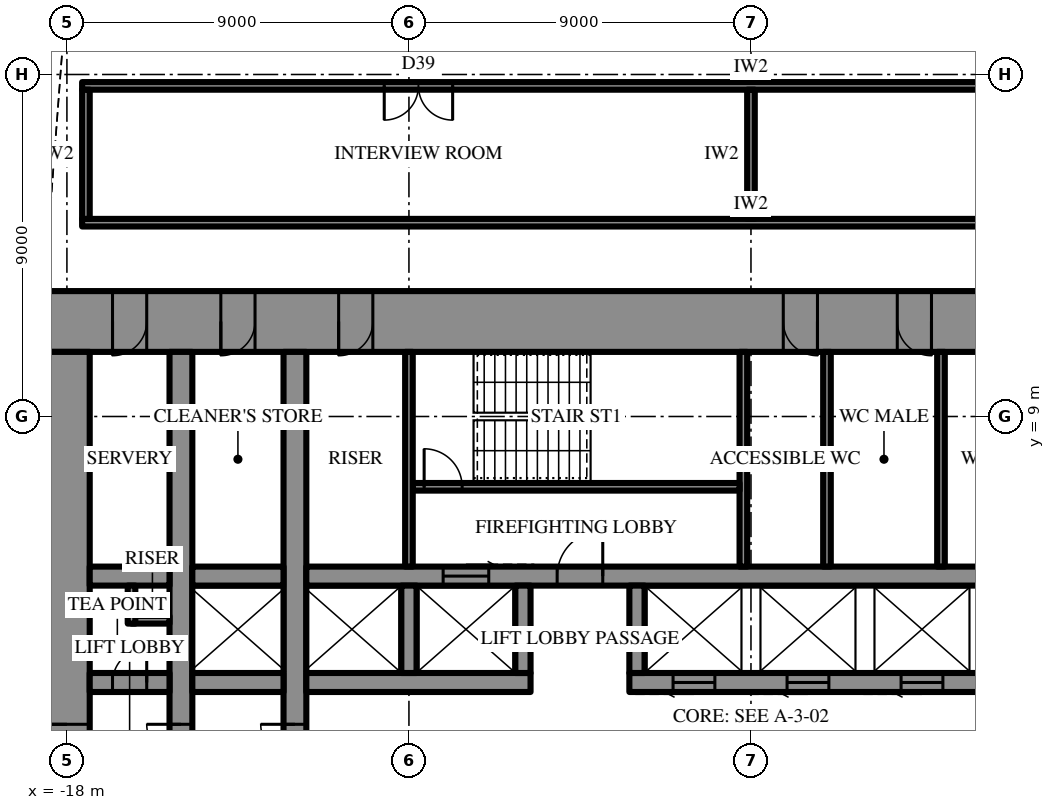
"""IFC4 building model, lengths in metres.
Left out: names, types, materials, properties, quantities, classifications, styles, units other than length and angle.
Written with IfcOpenShell. Run it as: python <this file> out.ifc"""

import sys

from ifc_helpers import new_model, si_unit, direction, frame, frame_2d, origin, place, context, subcontext, project, spatial, rectangle, extrude, element, fill, save


model = new_model("IFC4")
c1 = context("Model", 3, precision=1e-05, world=origin(), true_north=direction((0.0, 1.0)))
c2 = subcontext(c1, "Body", "Model", "MODEL_VIEW")
j1 = project(units=[si_unit("LENGTHUNIT", "METRE"), si_unit("PLANEANGLEUNIT", "RADIAN")], contexts=[c1])
p1 = place(None, origin())
s1 = spatial("IfcSite", under=j1, at=p1, CompositionType="ELEMENT")
p2 = place(p1, origin())
s2 = spatial("IfcBuilding", under=s1, at=p2, CompositionType="ELEMENT")
p3 = place(p2, frame((0.0, 0.0, 161.5)))
s3 = spatial("IfcBuildingStorey", under=s2, at=p3, CompositionType="ELEMENT", Elevation=161.5)
p4 = place(p3, frame((-18.6, 11.5, 0.0), z_axis=(0.0, 0.0, 1.0), x_axis=(1.0, 0.0, 0.0)))
e1 = element("IfcWall", 1, at=p4, inside=s3, PredefinedType="SHEAR", context=c2, shape_type="SweptSolid", body=[
    extrude(rectangle(XDim=37.2, YDim=1.6, at=frame_2d((18.6, 0.0))), origin(), (0.0, 0.0, 1.0), 4.2),
])
p5 = place(p4, frame((19.45, 0.0, 0.0)))
e2 = element("IfcOpeningElement", 2, at=p5, cuts=e1, PredefinedType="OPENING", context=c2, shape_type="SweptSolid", body=[
    extrude(rectangle(XDim=0.9, YDim=2.2, at=frame_2d((0.45, 1.1))), frame((0.0, 0.81, 0.0), z_axis=(0.0, -1.0, 0.0), x_axis=(1.0, 0.0, 0.0)), (0.0, 0.0, 1.0), 1.62),
])
p6 = place(p4, frame((22.45, 0.0, 0.0)))
e3 = element("IfcOpeningElement", 3, at=p6, cuts=e1, PredefinedType="OPENING", context=c2, shape_type="SweptSolid", body=[
    extrude(rectangle(XDim=0.9, YDim=2.2, at=frame_2d((0.45, 1.1))), frame((0.0, 0.81, 0.0), z_axis=(0.0, -1.0, 0.0), x_axis=(1.0, 0.0, 0.0)), (0.0, 0.0, 1.0), 1.62),
])
p7 = place(p4, frame((25.5, 0.0, 0.0)))
e4 = element("IfcOpeningElement", 4, at=p7, cuts=e1, PredefinedType="OPENING", context=c2, shape_type="SweptSolid", body=[
    extrude(rectangle(XDim=1.0, YDim=2.2, at=frame_2d((0.5, 1.1))), frame((0.0, 0.81, 0.0), z_axis=(0.0, -1.0, 0.0), x_axis=(1.0, 0.0, 0.0)), (0.0, 0.0, 1.0), 1.62),
])
p8 = place(p4, frame((1.8, 0.0, 0.0)))
e5 = element("IfcOpeningElement", 5, at=p8, cuts=e1, PredefinedType="OPENING", context=c2, shape_type="SweptSolid", body=[
    extrude(rectangle(XDim=0.9, YDim=2.2, at=frame_2d((0.45, 1.1))), frame((0.0, 0.81, 0.0), z_axis=(0.0, -1.0, 0.0), x_axis=(1.0, 0.0, 0.0)), (0.0, 0.0, 1.0), 1.62),
])
p9 = place(p4, frame((4.65, 0.0, 0.0)))
e6 = element("IfcOpeningElement", 6, at=p9, cuts=e1, PredefinedType="OPENING", context=c2, shape_type="SweptSolid", body=[
    extrude(rectangle(XDim=0.9, YDim=2.2, at=frame_2d((0.45, 1.1))), frame((0.0, 0.81, 0.0), z_axis=(0.0, -1.0, 0.0), x_axis=(1.0, 0.0, 0.0)), (0.0, 0.0, 1.0), 1.62),
])
p10 = place(p4, frame((7.75, 0.0, 0.0)))
e7 = element("IfcOpeningElement", 7, at=p10, cuts=e1, PredefinedType="OPENING", context=c2, shape_type="SweptSolid", body=[
    extrude(rectangle(XDim=0.9, YDim=2.2, at=frame_2d((0.45, 1.1))), frame((0.0, 0.81, 0.0), z_axis=(0.0, -1.0, 0.0), x_axis=(1.0, 0.0, 0.0)), (0.0, 0.0, 1.0), 1.62),
])
p11 = place(p4, frame((28.55, 0.0, 0.0)))
e8 = element("IfcOpeningElement", 8, at=p11, cuts=e1, PredefinedType="OPENING", context=c2, shape_type="SweptSolid", body=[
    extrude(rectangle(XDim=0.9, YDim=2.2, at=frame_2d((0.45, 1.1))), frame((0.0, 0.81, 0.0), z_axis=(0.0, -1.0, 0.0), x_axis=(1.0, 0.0, 0.0)), (0.0, 0.0, 1.0), 1.62),
])
p12 = place(p4, frame((31.65, 0.0, 0.0)))
e9 = element("IfcOpeningElement", 9, at=p12, cuts=e1, PredefinedType="OPENING", context=c2, shape_type="SweptSolid", body=[
    extrude(rectangle(XDim=0.9, YDim=2.2, at=frame_2d((0.45, 1.1))), frame((0.0, 0.81, 0.0), z_axis=(0.0, -1.0, 0.0), x_axis=(1.0, 0.0, 0.0)), (0.0, 0.0, 1.0), 1.62),
])
p13 = place(p4, frame((34.5, 0.0, 0.0)))
e10 = element("IfcOpeningElement", 10, at=p13, cuts=e1, PredefinedType="OPENING", context=c2, shape_type="SweptSolid", body=[
    extrude(rectangle(XDim=0.9, YDim=2.2, at=frame_2d((0.45, 1.1))), frame((0.0, 0.81, 0.0), z_axis=(0.0, -1.0, 0.0), x_axis=(1.0, 0.0, 0.0)), (0.0, 0.0, 1.0), 1.62),
])
p14 = place(p3, frame((-18.0, 10.7, 0.0), z_axis=(0.0, 0.0, 1.0), x_axis=(0.0, -1.0, 0.0)))
e11 = element("IfcWall", 11, at=p14, inside=s3, PredefinedType="SHEAR", context=c2, shape_type="SweptSolid", body=[
    extrude(rectangle(XDim=21.4, YDim=1.2, at=frame_2d((10.7, 0.0))), origin(), (0.0, 0.0, 1.0), 4.2),
])
p15 = place(p14, frame((9.8, 0.0, 0.0)))
e12 = element("IfcOpeningElement", 12, at=p15, cuts=e11, PredefinedType="OPENING", context=c2, shape_type="SweptSolid", body=[
    extrude(rectangle(XDim=1.8, YDim=2.4, at=frame_2d((0.9, 1.2))), frame((0.0, 0.61, 0.0), z_axis=(0.0, -1.0, 0.0), x_axis=(1.0, 0.0, 0.0)), (0.0, 0.0, 1.0), 1.22),
])
p16 = place(p3, frame((-12.0, -10.7, 0.0), z_axis=(0.0, 0.0, 1.0), x_axis=(0.0, 1.0, 0.0)))
e13 = element("IfcWall", 13, at=p16, inside=s3, PredefinedType="SHEAR", context=c2, shape_type="SweptSolid", body=[
    extrude(rectangle(XDim=21.4, YDim=0.6, at=frame_2d((10.7, 0.0))), origin(), (0.0, 0.0, 1.0), 4.2),
])
p17 = place(p16, frame((9.8, 0.0, 0.0)))
e14 = element("IfcOpeningElement", 14, at=p17, cuts=e13, PredefinedType="OPENING", context=c2, shape_type="SweptSolid", body=[
    extrude(rectangle(XDim=1.8, YDim=2.4, at=frame_2d((0.9, 1.2))), frame((0.0, 0.31, 0.0), z_axis=(0.0, -1.0, 0.0), x_axis=(1.0, 0.0, 0.0)), (0.0, 0.0, 1.0), 0.62),
])
p18 = place(p3, frame((-15.0, -10.7, 0.0), z_axis=(0.0, 0.0, 1.0), x_axis=(0.0, 1.0, 0.0)))
e15 = element("IfcWall", 15, at=p18, inside=s3, PredefinedType="SHEAR", context=c2, shape_type="SweptSolid", body=[
    extrude(rectangle(XDim=21.4, YDim=0.6, at=frame_2d((10.7, 0.0))), origin(), (0.0, 0.0, 1.0), 4.2),
])
p19 = place(p18, frame((9.8, 0.0, 0.0)))
e16 = element("IfcOpeningElement", 16, at=p19, cuts=e15, PredefinedType="OPENING", context=c2, shape_type="SweptSolid", body=[
    extrude(rectangle(XDim=1.8, YDim=2.4, at=frame_2d((0.9, 1.2))), frame((0.0, 0.31, 0.0), z_axis=(0.0, -1.0, 0.0), x_axis=(1.0, 0.0, 0.0)), (0.0, 0.0, 1.0), 0.62),
])
p20 = place(p3, frame((-17.4, 2.0, 0.0), z_axis=(0.0, 0.0, 1.0), x_axis=(1.0, 0.0, 0.0)))
e17 = element("IfcWall", 17, at=p20, inside=s3, PredefinedType="SHEAR", context=c2, shape_type="SweptSolid", body=[
    extrude(rectangle(XDim=2.1, YDim=0.5, at=frame_2d((1.05, 0.0))), origin(), (0.0, 0.0, 1.0), 4.2),
])
p21 = place(p20, frame((0.6, 0.0, 0.0)))
e18 = element("IfcOpeningElement", 18, at=p21, cuts=e17, PredefinedType="OPENING", context=c2, shape_type="SweptSolid", body=[
    extrude(rectangle(XDim=0.9, YDim=2.2, at=frame_2d((0.45, 1.1))), frame((0.0, 0.26, 0.0), z_axis=(0.0, -1.0, 0.0), x_axis=(1.0, 0.0, 0.0)), (0.0, 0.0, 1.0), 0.52),
])
p22 = place(p3, frame((-14.7, 2.0, 0.0), z_axis=(0.0, 0.0, 1.0), x_axis=(1.0, 0.0, 0.0)))
e19 = element("IfcWall", 19, at=p22, inside=s3, PredefinedType="SHEAR", context=c2, shape_type="SweptSolid", body=[
    extrude(rectangle(XDim=2.4, YDim=0.5, at=frame_2d((1.2, 0.0))), origin(), (0.0, 0.0, 1.0), 4.2),
])
p23 = place(p3, frame((-11.7, 2.0, 0.0), z_axis=(0.0, 0.0, 1.0), x_axis=(1.0, 0.0, 0.0)))
e20 = element("IfcWall", 20, at=p23, inside=s3, PredefinedType="SHEAR", context=c2, shape_type="SweptSolid", body=[
    extrude(rectangle(XDim=5.9, YDim=0.5, at=frame_2d((2.95, 0.0))), origin(), (0.0, 0.0, 1.0), 4.2),
])
p24 = place(p3, frame((-3.2, 2.0, 0.0), z_axis=(0.0, 0.0, 1.0), x_axis=(1.0, 0.0, 0.0)))
e21 = element("IfcWall", 21, at=p24, inside=s3, PredefinedType="SHEAR", context=c2, shape_type="SweptSolid", body=[
    extrude(rectangle(XDim=14.9, YDim=0.5, at=frame_2d((7.45, 0.0))), origin(), (0.0, 0.0, 1.0), 4.2),
])
p25 = place(p24, frame((1.15, 0.0, 0.0)))
e22 = element("IfcOpeningElement", 22, at=p25, cuts=e21, PredefinedType="OPENING", context=c2, shape_type="SweptSolid", body=[
    extrude(rectangle(XDim=1.1, YDim=2.2, at=frame_2d((0.55, 1.1))), frame((0.0, 0.26, 0.0), z_axis=(0.0, -1.0, 0.0), x_axis=(1.0, 0.0, 0.0)), (0.0, 0.0, 1.0), 0.52),
])
p26 = place(p24, frame((4.15, 0.0, 0.0)))
e23 = element("IfcOpeningElement", 23, at=p26, cuts=e21, PredefinedType="OPENING", context=c2, shape_type="SweptSolid", body=[
    extrude(rectangle(XDim=1.1, YDim=2.2, at=frame_2d((0.55, 1.1))), frame((0.0, 0.26, 0.0), z_axis=(0.0, -1.0, 0.0), x_axis=(1.0, 0.0, 0.0)), (0.0, 0.0, 1.0), 0.52),
])
p27 = place(p24, frame((7.15, 0.0, 0.0)))
e24 = element("IfcOpeningElement", 24, at=p27, cuts=e21, PredefinedType="OPENING", context=c2, shape_type="SweptSolid", body=[
    extrude(rectangle(XDim=1.1, YDim=2.2, at=frame_2d((0.55, 1.1))), frame((0.0, 0.26, 0.0), z_axis=(0.0, -1.0, 0.0), x_axis=(1.0, 0.0, 0.0)), (0.0, 0.0, 1.0), 0.52),
])
p28 = place(p24, frame((10.15, 0.0, 0.0)))
e25 = element("IfcOpeningElement", 25, at=p28, cuts=e21, PredefinedType="OPENING", context=c2, shape_type="SweptSolid", body=[
    extrude(rectangle(XDim=1.1, YDim=2.2, at=frame_2d((0.55, 1.1))), frame((0.0, 0.26, 0.0), z_axis=(0.0, -1.0, 0.0), x_axis=(1.0, 0.0, 0.0)), (0.0, 0.0, 1.0), 0.52),
])
p29 = place(p3, frame((-17.4, 4.8, 0.0), z_axis=(0.0, 0.0, 1.0), x_axis=(1.0, 0.0, 0.0)))
e26 = element("IfcWall", 26, at=p29, inside=s3, PredefinedType="SHEAR", context=c2, shape_type="SweptSolid", body=[
    extrude(rectangle(XDim=2.1, YDim=0.5, at=frame_2d((1.05, 0.0))), origin(), (0.0, 0.0, 1.0), 4.2),
])
p30 = place(p3, frame((-14.7, 4.8, 0.0), z_axis=(0.0, 0.0, 1.0), x_axis=(1.0, 0.0, 0.0)))
e27 = element("IfcWall", 27, at=p30, inside=s3, PredefinedType="SHEAR", context=c2, shape_type="SweptSolid", body=[
    extrude(rectangle(XDim=2.4, YDim=0.5, at=frame_2d((1.2, 0.0))), origin(), (0.0, 0.0, 1.0), 4.2),
])
p31 = place(p3, frame((-11.7, 4.8, 0.0), z_axis=(0.0, 0.0, 1.0), x_axis=(1.0, 0.0, 0.0)))
e28 = element("IfcWall", 28, at=p31, inside=s3, PredefinedType="SHEAR", context=c2, shape_type="SweptSolid", body=[
    extrude(rectangle(XDim=23.4, YDim=0.5, at=frame_2d((11.7, 0.0))), origin(), (0.0, 0.0, 1.0), 4.2),
])
p32 = place(p31, frame((6.6, 0.0, 0.0)))
e29 = element("IfcOpeningElement", 29, at=p32, cuts=e28, PredefinedType="OPENING", context=c2, shape_type="SweptSolid", body=[
    extrude(rectangle(XDim=1.2, YDim=2.2, at=frame_2d((0.6, 1.1))), frame((0.0, 0.26, 0.0), z_axis=(0.0, -1.0, 0.0), x_axis=(1.0, 0.0, 0.0)), (0.0, 0.0, 1.0), 0.52),
])
p33 = place(p31, frame((3.6, 0.0, 0.0)))
e30 = element("IfcOpeningElement", 30, at=p33, cuts=e28, PredefinedType="OPENING", context=c2, shape_type="SweptSolid", body=[
    extrude(rectangle(XDim=1.2, YDim=2.2, at=frame_2d((0.6, 1.1))), frame((0.0, 0.26, 0.0), z_axis=(0.0, -1.0, 0.0), x_axis=(1.0, 0.0, 0.0)), (0.0, 0.0, 1.0), 0.52),
])
for number, where, z_axis, x_axis in (
    (31, (-9.0, 2.25, 0.0), (0.0, 0.0, 1.0), (0.0, 1.0, 0.0)),
    (32, (-6.0, 2.25, 0.0), (0.0, 0.0, 1.0), (0.0, 1.0, 0.0)),
    (33, (-3.0, 2.25, 0.0), (0.0, 0.0, 1.0), (0.0, 1.0, 0.0)),
):
    element("IfcWall", number, at=place(p3, frame(where, z_axis=z_axis, x_axis=x_axis)), inside=s3, PredefinedType="SHEAR", context=c2, shape_type="SweptSolid", body=[
        extrude(rectangle(XDim=2.3, YDim=0.4, at=frame_2d((1.15, 0.0))), origin(), (0.0, 0.0, 1.0), 4.2),
    ])
p34 = place(p3, frame((-0.2, 5.05, 0.0), z_axis=(0.0, 0.0, 1.0), x_axis=(0.0, 1.0, 0.0)))
e34 = element("IfcWall", 34, at=p34, inside=s3, PredefinedType="SHEAR", context=c2, shape_type="SweptSolid", body=[
    extrude(rectangle(XDim=5.65, YDim=0.2, at=frame_2d((2.825, 0.0))), origin(), (0.0, 0.0, 1.0), 4.2),
])
p35 = place(p3, frame((-8.9, 7.15, 0.0), z_axis=(0.0, 0.0, 1.0), x_axis=(1.0, 0.0, 0.0)))
e35 = element("IfcWall", 35, at=p35, inside=s3, PredefinedType="SHEAR", context=c2, shape_type="SweptSolid", body=[
    extrude(rectangle(XDim=8.6, YDim=0.2, at=frame_2d((4.3, 0.0))), origin(), (0.0, 0.0, 1.0), 4.2),
])
p36 = place(p35, frame((0.3, 0.0, 0.0)))
e36 = element("IfcOpeningElement", 36, at=p36, cuts=e35, PredefinedType="OPENING", context=c2, shape_type="SweptSolid", body=[
    extrude(rectangle(XDim=1.0, YDim=2.2, at=frame_2d((0.5, 1.1))), frame((0.0, 0.11, 0.0), z_axis=(0.0, -1.0, 0.0), x_axis=(1.0, 0.0, 0.0)), (0.0, 0.0, 1.0), 0.22),
])
for number, where, z_axis, x_axis in (
    (37, (-9.0, 5.05, 0.0), (0.0, 0.0, 1.0), (0.0, 1.0, 0.0)),
    (38, (2.0, 5.05, 0.0), (0.0, 0.0, 1.0), (0.0, 1.0, 0.0)),
    (39, (5.0, 5.05, 0.0), (0.0, 0.0, 1.0), (0.0, 1.0, 0.0)),
):
    element("IfcWall", number, at=place(p3, frame(where, z_axis=z_axis, x_axis=x_axis)), inside=s3, PredefinedType="PARTITIONING", context=c2, shape_type="SweptSolid", body=[
        extrude(rectangle(XDim=5.65, YDim=0.2, at=frame_2d((2.825, 0.0))), origin(), (0.0, 0.0, 1.0), 4.0),
    ])
for number, where, z_axis, x_axis in (
    (40, (-16.3, 3.65, 0.0), (0.0, 0.0, 1.0), (1.0, 0.0, 0.0)),
    (41, (-16.3, 3.55, 0.0), (0.0, 0.0, 1.0), (0.0, 1.0, 0.0)),
):
    element("IfcWall", number, at=place(p3, frame(where, z_axis=z_axis, x_axis=x_axis)), inside=s3, PredefinedType="PARTITIONING", context=c2, shape_type="SweptSolid", body=[
        extrude(rectangle(XDim=1.0, YDim=0.2, at=frame_2d((0.5, 0.0))), origin(), (0.0, 0.0, 1.0), 4.0),
    ])
p37 = place(p3, frame((-17.6, 14.1, 0.0), z_axis=(0.0, 0.0, 1.0), x_axis=(1.0, 0.0, 0.0)))
e42 = element("IfcWall", 42, at=p37, inside=s3, PredefinedType="PARTITIONING", context=c2, shape_type="SweptSolid", body=[
    extrude(rectangle(XDim=35.2, YDim=0.2, at=frame_2d((17.6, 0.0))), origin(), (0.0, 0.0, 1.0), 4.0),
])
p38 = place(p3, frame((-17.6, 17.7, 0.0), z_axis=(0.0, 0.0, 1.0), x_axis=(1.0, 0.0, 0.0)))
e43 = element("IfcWall", 43, at=p38, inside=s3, PredefinedType="PARTITIONING", context=c2, shape_type="SweptSolid", body=[
    extrude(rectangle(XDim=35.2, YDim=0.2, at=frame_2d((17.6, 0.0))), origin(), (0.0, 0.0, 1.0), 4.0),
])
p39 = place(p38, frame((7.95, 0.0, 0.0)))
e44 = element("IfcOpeningElement", 44, at=p39, cuts=e43, PredefinedType="OPENING", context=c2, shape_type="SweptSolid", body=[
    extrude(rectangle(XDim=1.8, YDim=2.4, at=frame_2d((0.9, 1.2))), frame((0.0, 0.11, 0.0), z_axis=(0.0, -1.0, 0.0), x_axis=(1.0, 0.0, 0.0)), (0.0, 0.0, 1.0), 0.22),
])
p40 = place(p38, frame((25.45, 0.0, 0.0)))
e45 = element("IfcOpeningElement", 45, at=p40, cuts=e43, PredefinedType="OPENING", context=c2, shape_type="SweptSolid", body=[
    extrude(rectangle(XDim=1.8, YDim=2.4, at=frame_2d((0.9, 1.2))), frame((0.0, 0.11, 0.0), z_axis=(0.0, -1.0, 0.0), x_axis=(1.0, 0.0, 0.0)), (0.0, 0.0, 1.0), 0.22),
])
p41 = place(p3, frame((-17.5, 14.2, 0.0), z_axis=(0.0, 0.0, 1.0), x_axis=(0.0, 1.0, 0.0)))
e46 = element("IfcWall", 46, at=p41, inside=s3, PredefinedType="PARTITIONING", context=c2, shape_type="SweptSolid", body=[
    extrude(rectangle(XDim=3.4, YDim=0.2, at=frame_2d((1.7, 0.0))), origin(), (0.0, 0.0, 1.0), 4.0),
])
p42 = place(p3, frame((0.0, 14.2, 0.0), z_axis=(0.0, 0.0, 1.0), x_axis=(0.0, 1.0, 0.0)))
e47 = element("IfcWall", 47, at=p42, inside=s3, PredefinedType="PARTITIONING", context=c2, shape_type="SweptSolid", body=[
    extrude(rectangle(XDim=3.4, YDim=0.2, at=frame_2d((1.7, 0.0))), origin(), (0.0, 0.0, 1.0), 2.992),
])
p43 = place(p15, frame((1.8, 0.0, 0.0), z_axis=(0.0, 0.0, 1.0), x_axis=(-1.0, 0.0, 0.0)))
e48 = element("IfcDoor", 48, at=p43, inside=s3, OperationType="DOUBLE_DOOR_SINGLE_SWING", PredefinedType="DOOR", context=c2, shape_type="SweptSolid", body=[
    extrude(rectangle(XDim=1.8, YDim=2.4, at=frame_2d((0.9, 1.2))), frame((0.0, 0.025, 0.0), z_axis=(0.0, -1.0, 0.0), x_axis=(1.0, 0.0, 0.0)), (0.0, 0.0, 1.0), 0.05),
])
fill(e12, e48)
p44 = place(p32, origin())
e49 = element("IfcDoor", 49, at=p44, inside=s3, OperationType="SINGLE_SWING_LEFT", PredefinedType="DOOR", context=c2, shape_type="SweptSolid", body=[
    extrude(rectangle(XDim=1.2, YDim=2.2, at=frame_2d((0.6, 1.1))), frame((0.0, 0.025, 0.0), z_axis=(0.0, -1.0, 0.0), x_axis=(1.0, 0.0, 0.0)), (0.0, 0.0, 1.0), 0.05),
])
fill(e29, e49)
p45 = place(p36, origin())
e50 = element("IfcDoor", 50, at=p45, inside=s3, OperationType="SINGLE_SWING_RIGHT", PredefinedType="DOOR", context=c2, shape_type="SweptSolid", body=[
    extrude(rectangle(XDim=1.0, YDim=2.2, at=frame_2d((0.5, 1.1))), frame((0.0, 0.025, 0.0), z_axis=(0.0, -1.0, 0.0), x_axis=(1.0, 0.0, 0.0)), (0.0, 0.0, 1.0), 0.05),
])
fill(e36, e50)
p46 = place(p5, frame((0.9, 0.0, 0.0), z_axis=(0.0, 0.0, 1.0), x_axis=(-1.0, 0.0, 0.0)))
e51 = element("IfcDoor", 51, at=p46, inside=s3, OperationType="SINGLE_SWING_RIGHT", PredefinedType="DOOR", context=c2, shape_type="SweptSolid", body=[
    extrude(rectangle(XDim=0.9, YDim=2.2, at=frame_2d((0.45, 1.1))), frame((0.0, 0.025, 0.0), z_axis=(0.0, -1.0, 0.0), x_axis=(1.0, 0.0, 0.0)), (0.0, 0.0, 1.0), 0.05),
])
fill(e2, e51)
p47 = place(p6, frame((0.9, 0.0, 0.0), z_axis=(0.0, 0.0, 1.0), x_axis=(-1.0, 0.0, 0.0)))
e52 = element("IfcDoor", 52, at=p47, inside=s3, OperationType="SINGLE_SWING_RIGHT", PredefinedType="DOOR", context=c2, shape_type="SweptSolid", body=[
    extrude(rectangle(XDim=0.9, YDim=2.2, at=frame_2d((0.45, 1.1))), frame((0.0, 0.025, 0.0), z_axis=(0.0, -1.0, 0.0), x_axis=(1.0, 0.0, 0.0)), (0.0, 0.0, 1.0), 0.05),
])
fill(e3, e52)
p48 = place(p8, frame((0.9, 0.0, 0.0), z_axis=(0.0, 0.0, 1.0), x_axis=(-1.0, 0.0, 0.0)))
e53 = element("IfcDoor", 53, at=p48, inside=s3, OperationType="SINGLE_SWING_LEFT", PredefinedType="DOOR", context=c2, shape_type="SweptSolid", body=[
    extrude(rectangle(XDim=0.9, YDim=2.2, at=frame_2d((0.45, 1.1))), frame((0.0, 0.025, 0.0), z_axis=(0.0, -1.0, 0.0), x_axis=(1.0, 0.0, 0.0)), (0.0, 0.0, 1.0), 0.05),
])
fill(e5, e53)
p49 = place(p9, frame((0.9, 0.0, 0.0), z_axis=(0.0, 0.0, 1.0), x_axis=(-1.0, 0.0, 0.0)))
e54 = element("IfcDoor", 54, at=p49, inside=s3, OperationType="SINGLE_SWING_LEFT", PredefinedType="DOOR", context=c2, shape_type="SweptSolid", body=[
    extrude(rectangle(XDim=0.9, YDim=2.2, at=frame_2d((0.45, 1.1))), frame((0.0, 0.025, 0.0), z_axis=(0.0, -1.0, 0.0), x_axis=(1.0, 0.0, 0.0)), (0.0, 0.0, 1.0), 0.05),
])
fill(e6, e54)
p50 = place(p10, frame((0.9, 0.0, 0.0), z_axis=(0.0, 0.0, 1.0), x_axis=(-1.0, 0.0, 0.0)))
e55 = element("IfcDoor", 55, at=p50, inside=s3, OperationType="SINGLE_SWING_LEFT", PredefinedType="DOOR", context=c2, shape_type="SweptSolid", body=[
    extrude(rectangle(XDim=0.9, YDim=2.2, at=frame_2d((0.45, 1.1))), frame((0.0, 0.025, 0.0), z_axis=(0.0, -1.0, 0.0), x_axis=(1.0, 0.0, 0.0)), (0.0, 0.0, 1.0), 0.05),
])
fill(e7, e55)
p51 = place(p21, origin())
e56 = element("IfcDoor", 56, at=p51, inside=s3, OperationType="SINGLE_SWING_LEFT", PredefinedType="DOOR", context=c2, shape_type="SweptSolid", body=[
    extrude(rectangle(XDim=0.9, YDim=2.2, at=frame_2d((0.45, 1.1))), frame((0.0, 0.025, 0.0), z_axis=(0.0, -1.0, 0.0), x_axis=(1.0, 0.0, 0.0)), (0.0, 0.0, 1.0), 0.05),
])
fill(e18, e56)
p52 = place(p17, origin())
e57 = element("IfcDoor", 57, at=p52, inside=s3, OperationType="DOUBLE_DOOR_SINGLE_SWING", PredefinedType="DOOR", context=c2, shape_type="SweptSolid", body=[
    extrude(rectangle(XDim=1.8, YDim=2.4, at=frame_2d((0.9, 1.2))), frame((0.0, 0.025, 0.0), z_axis=(0.0, -1.0, 0.0), x_axis=(1.0, 0.0, 0.0)), (0.0, 0.0, 1.0), 0.05),
])
fill(e14, e57)
p53 = place(p19, origin())
e58 = element("IfcDoor", 58, at=p53, inside=s3, OperationType="DOUBLE_DOOR_SINGLE_SWING", PredefinedType="DOOR", context=c2, shape_type="SweptSolid", body=[
    extrude(rectangle(XDim=1.8, YDim=2.4, at=frame_2d((0.9, 1.2))), frame((0.0, 0.025, 0.0), z_axis=(0.0, -1.0, 0.0), x_axis=(1.0, 0.0, 0.0)), (0.0, 0.0, 1.0), 0.05),
])
fill(e16, e58)
p54 = place(p33, origin())
e59 = element("IfcDoor", 59, at=p54, inside=s3, OperationType="SLIDING_TO_LEFT", PredefinedType="DOOR", context=c2, shape_type="SweptSolid", body=[
    extrude(rectangle(XDim=1.2, YDim=2.2, at=frame_2d((0.6, 1.1))), frame((0.0, 0.025, 0.0), z_axis=(0.0, -1.0, 0.0), x_axis=(1.0, 0.0, 0.0)), (0.0, 0.0, 1.0), 0.05),
])
fill(e30, e59)
p55 = place(p25, frame((1.1, 0.0, 0.0), z_axis=(0.0, 0.0, 1.0), x_axis=(-1.0, 0.0, 0.0)))
e60 = element("IfcDoor", 60, at=p55, inside=s3, OperationType="SLIDING_TO_LEFT", PredefinedType="DOOR", context=c2, shape_type="SweptSolid", body=[
    extrude(rectangle(XDim=1.1, YDim=2.2, at=frame_2d((0.55, 1.1))), frame((0.0, 0.025, 0.0), z_axis=(0.0, -1.0, 0.0), x_axis=(1.0, 0.0, 0.0)), (0.0, 0.0, 1.0), 0.05),
])
fill(e22, e60)
p56 = place(p26, frame((1.1, 0.0, 0.0), z_axis=(0.0, 0.0, 1.0), x_axis=(-1.0, 0.0, 0.0)))
e61 = element("IfcDoor", 61, at=p56, inside=s3, OperationType="SLIDING_TO_LEFT", PredefinedType="DOOR", context=c2, shape_type="SweptSolid", body=[
    extrude(rectangle(XDim=1.1, YDim=2.2, at=frame_2d((0.55, 1.1))), frame((0.0, 0.025, 0.0), z_axis=(0.0, -1.0, 0.0), x_axis=(1.0, 0.0, 0.0)), (0.0, 0.0, 1.0), 0.05),
])
fill(e23, e61)
p57 = place(p27, frame((1.1, 0.0, 0.0), z_axis=(0.0, 0.0, 1.0), x_axis=(-1.0, 0.0, 0.0)))
e62 = element("IfcDoor", 62, at=p57, inside=s3, OperationType="SLIDING_TO_LEFT", PredefinedType="DOOR", context=c2, shape_type="SweptSolid", body=[
    extrude(rectangle(XDim=1.1, YDim=2.2, at=frame_2d((0.55, 1.1))), frame((0.0, 0.025, 0.0), z_axis=(0.0, -1.0, 0.0), x_axis=(1.0, 0.0, 0.0)), (0.0, 0.0, 1.0), 0.05),
])
fill(e24, e62)
p58 = place(p39, frame((1.8, 0.0, 0.0), z_axis=(0.0, 0.0, 1.0), x_axis=(-1.0, 0.0, 0.0)))
e63 = element("IfcDoor", 63, at=p58, inside=s3, OperationType="DOUBLE_DOOR_SINGLE_SWING", PredefinedType="DOOR", context=c2, shape_type="SweptSolid", body=[
    extrude(rectangle(XDim=1.8, YDim=2.4, at=frame_2d((0.9, 1.2))), frame((0.0, 0.025, 0.0), z_axis=(0.0, -1.0, 0.0), x_axis=(1.0, 0.0, 0.0)), (0.0, 0.0, 1.0), 0.05),
])
fill(e44, e63)
save(model, sys.argv[1])
